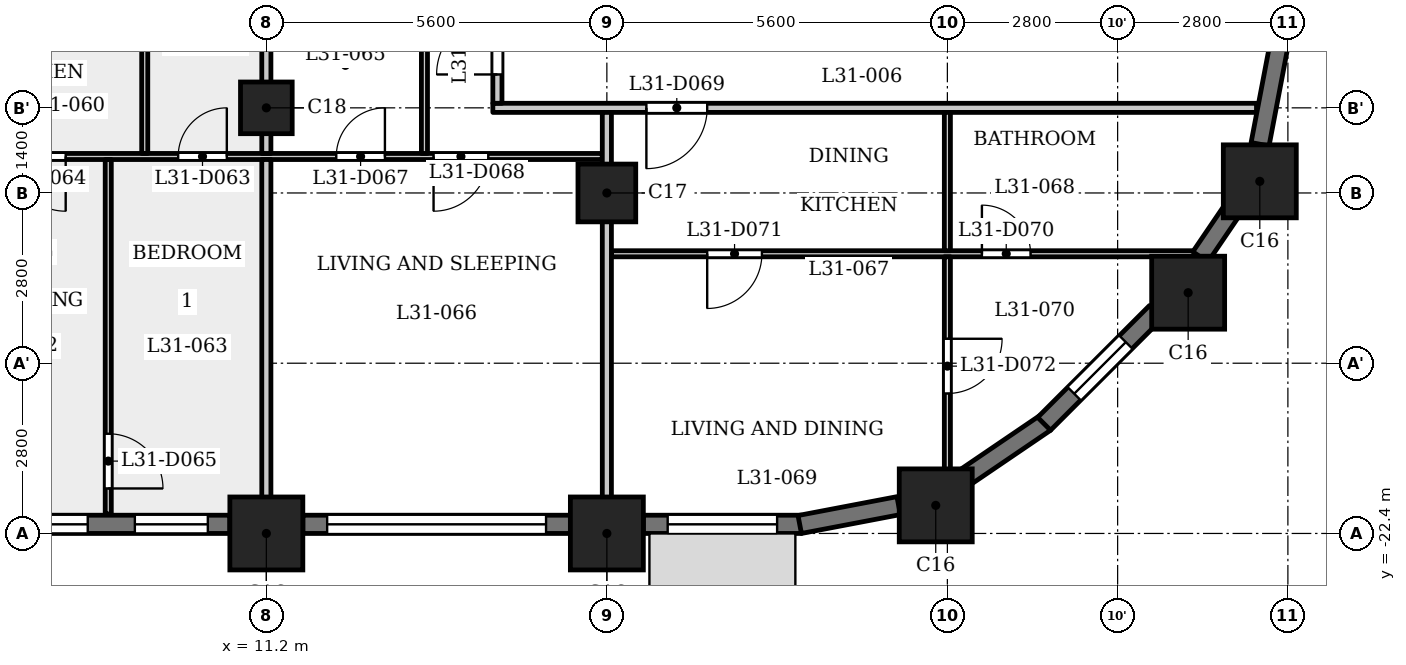
"""IFC4 building model, lengths in metres.
Left out: names, types, materials, properties, quantities, classifications, styles, units other than length and angle.
Written with IfcOpenShell. Run it as: python <this file> out.ifc"""

import sys

from ifc_helpers import new_model, si_unit, direction, frame, frame_2d, origin, origin_2d, place, context, subcontext, project, spatial, rectangle, extrude, element, fill, save


model = new_model("IFC4")
c1 = context("Model", 3, precision=1e-05, world=origin(), true_north=direction((0.0, 1.0)))
c2 = subcontext(c1, "Body", "Model", "MODEL_VIEW")
j1 = project(units=[si_unit("LENGTHUNIT", "METRE"), si_unit("PLANEANGLEUNIT", "RADIAN")], contexts=[c1])
p1 = place(None, origin())
s1 = spatial("IfcSite", under=j1, at=p1, CompositionType="ELEMENT")
p2 = place(p1, origin())
s2 = spatial("IfcBuilding", under=s1, at=p2, CompositionType="ELEMENT")
p3 = place(p2, frame((0.0, 0.0, 121.8)))
s3 = spatial("IfcBuildingStorey", under=s2, at=p3, CompositionType="ELEMENT", Elevation=121.8)
for number, where, z_axis, x_axis in (
    (1, (11.2, -22.4, 0.0), (0.0, 0.0, 1.0), (1.0, 0.0, 0.0)),
    (2, (16.8, -22.4, 0.0), (0.0, 0.0, 1.0), (1.0, 0.0, 0.0)),
    (3, (22.209, -21.938, 0.0), (0.0, 0.0, 1.0), (1.0, 0.0, 0.0)),
    (4, (26.36, -18.44, 0.0), (0.0, 0.0, 1.0), (1.0, 0.0, 0.0)),
    (5, (27.538, -16.609, 0.0), (0.0, 0.0, 1.0), (1.0, 0.0, 0.0)),
):
    element("IfcColumn", number, at=place(p3, frame(where, z_axis=z_axis, x_axis=x_axis)), inside=s3, PredefinedType="COLUMN", context=c2, shape_type="SweptSolid", body=[
        extrude(rectangle(XDim=1.2, YDim=1.2, at=origin_2d()), origin(), (0.0, 0.0, 1.0), 3.5),
    ])
p4 = place(p3, frame((16.8, -16.8, 0.0), z_axis=(0.0, 0.0, 1.0), x_axis=(1.0, 0.0, 0.0)))
e6 = element("IfcColumn", 6, at=p4, inside=s3, PredefinedType="COLUMN", context=c2, shape_type="SweptSolid", body=[
    extrude(rectangle(XDim=0.95, YDim=0.95, at=origin_2d()), origin(), (0.0, 0.0, 1.0), 3.5),
])
p5 = place(p3, frame((11.2, -15.4, 0.0), z_axis=(0.0, 0.0, 1.0), x_axis=(1.0, 0.0, 0.0)))
e7 = element("IfcColumn", 7, at=p5, inside=s3, PredefinedType="COLUMN", context=c2, shape_type="SweptSolid", body=[
    extrude(rectangle(XDim=0.85, YDim=0.85, at=origin_2d()), origin(), (0.0, 0.0, 1.0), 3.5),
])
p6 = place(p3, frame((6.2, -22.25, 0.0), z_axis=(0.0, 0.0, 1.0), x_axis=(1.0, 0.0, 0.0)))
e8 = element("IfcWall", 8, at=p6, inside=s3, PredefinedType="SOLIDWALL", context=c2, shape_type="SweptSolid", body=[
    extrude(rectangle(XDim=4.4, YDim=0.3, at=frame_2d((2.2, 0.0))), origin(), (0.0, 0.0, 1.0), 2.35),
])
p7 = place(p6, frame((0.262, 0.0, 0.9)))
e9 = element("IfcOpeningElement", 9, at=p7, cuts=e8, PredefinedType="OPENING", context=c2, shape_type="SweptSolid", body=[
    extrude(rectangle(XDim=1.8, YDim=1.25, at=frame_2d((0.9, 0.625))), frame((0.0, 0.16, 0.0), z_axis=(0.0, -1.0, 0.0), x_axis=(1.0, 0.0, 0.0)), (0.0, 0.0, 1.0), 0.32),
])
p8 = place(p6, frame((2.837, 0.0, 0.6)))
e10 = element("IfcOpeningElement", 10, at=p8, cuts=e8, PredefinedType="OPENING", context=c2, shape_type="SweptSolid", body=[
    extrude(rectangle(XDim=1.2, YDim=1.55, at=frame_2d((0.6, 0.775))), frame((0.0, 0.16, 0.0), z_axis=(0.0, -1.0, 0.0), x_axis=(1.0, 0.0, 0.0)), (0.0, 0.0, 1.0), 0.32),
])
p9 = place(p3, frame((11.8, -22.25, 0.0), z_axis=(0.0, 0.0, 1.0), x_axis=(1.0, 0.0, 0.0)))
e11 = element("IfcWall", 11, at=p9, inside=s3, PredefinedType="SOLIDWALL", context=c2, shape_type="SweptSolid", body=[
    extrude(rectangle(XDim=4.4, YDim=0.3, at=frame_2d((2.2, 0.0))), origin(), (0.0, 0.0, 1.0), 2.35),
])
p10 = place(p9, frame((0.4, 0.0, 1.2)))
e12 = element("IfcOpeningElement", 12, at=p10, cuts=e11, PredefinedType="OPENING", context=c2, shape_type="SweptSolid", body=[
    extrude(rectangle(XDim=3.6, YDim=0.95, at=frame_2d((1.8, 0.475))), frame((0.0, 0.16, 0.0), z_axis=(0.0, -1.0, 0.0), x_axis=(1.0, 0.0, 0.0)), (0.0, 0.0, 1.0), 0.32),
])
p11 = place(p3, frame((17.4, -22.25, 0.0), z_axis=(0.0, 0.0, 1.0), x_axis=(1.0, 0.0, 0.0)))
e13 = element("IfcWall", 13, at=p11, inside=s3, PredefinedType="SOLIDWALL", context=c2, shape_type="SweptSolid", body=[
    extrude(rectangle(XDim=2.6, YDim=0.3, at=frame_2d((1.3, 0.0))), origin(), (0.0, 0.0, 1.0), 2.35),
])
p12 = place(p11, frame((0.4, 0.0, 0.9)))
e14 = element("IfcOpeningElement", 14, at=p12, cuts=e13, PredefinedType="OPENING", context=c2, shape_type="SweptSolid", body=[
    extrude(rectangle(XDim=1.8, YDim=1.25, at=frame_2d((0.9, 0.625))), frame((0.0, 0.16, 0.0), z_axis=(0.0, -1.0, 0.0), x_axis=(1.0, 0.0, 0.0)), (0.0, 0.0, 1.0), 0.32),
])
for number, where, z_axis, x_axis in (
    (15, (19.972, -22.253, 0.0), (0.0, 0.0, 1.0), (0.982, 0.187, 0.0)),
    (16, (22.643, -21.51, 0.0), (0.0, 0.0, 1.0), (0.827, 0.562, 0.0)),
):
    element("IfcWall", number, at=place(p3, frame(where, z_axis=z_axis, x_axis=x_axis)), inside=s3, PredefinedType="SOLIDWALL", context=c2, shape_type="SweptSolid", body=[
        extrude(rectangle(XDim=1.656, YDim=0.3, at=frame_2d((0.828, 0.0))), origin(), (0.0, 0.0, 1.0), 2.35),
    ])
p13 = place(p3, frame((23.991, -20.597, 0.0), z_axis=(0.0, 0.0, 1.0), x_axis=(0.707106781187, 0.707106781187, 0.0)))
e17 = element("IfcWall", 17, at=p13, inside=s3, PredefinedType="SOLIDWALL", context=c2, shape_type="SweptSolid", body=[
    extrude(rectangle(XDim=2.6, YDim=0.3, at=frame_2d((1.3, 0.0))), origin(), (0.0, 0.0, 1.0), 2.35),
])
p14 = place(p13, frame((0.7, 0.0, 0.6)))
e18 = element("IfcOpeningElement", 18, at=p14, cuts=e17, PredefinedType="OPENING", context=c2, shape_type="SweptSolid", body=[
    extrude(rectangle(XDim=1.2, YDim=1.55, at=frame_2d((0.6, 0.775))), frame((0.0, 0.16, 0.0), z_axis=(0.0, -1.0, 0.0), x_axis=(1.0, 0.0, 0.0)), (0.0, 0.0, 1.0), 0.32),
])
p15 = place(p3, frame((26.561, -17.851, 0.0), z_axis=(0.0, 0.0, 1.0), x_axis=(0.562173331661, 0.827019434577, 0.0)))
e19 = element("IfcWall", 19, at=p15, inside=s3, PredefinedType="SOLIDWALL", context=c2, shape_type="SweptSolid", body=[
    extrude(rectangle(XDim=0.977, YDim=0.3, at=frame_2d((0.489, 0.0))), origin(), (0.0, 0.0, 1.0), 3.15),
])
p16 = place(p3, frame((27.542, -15.999, 0.0), z_axis=(0.0, 0.0, 1.0), x_axis=(0.187349172861, 0.982293381546, 0.0)))
e20 = element("IfcWall", 20, at=p16, inside=s3, PredefinedType="SOLIDWALL", context=c2, shape_type="SweptSolid", body=[
    extrude(rectangle(XDim=1.656, YDim=0.3, at=frame_2d((0.828, 0.0))), origin(), (0.0, 0.0, 1.0), 2.35),
])
p17 = place(p3, frame((16.875, -17.8, 0.0), z_axis=(0.0, 0.0, 1.0), x_axis=(1.0, 0.0, 0.0)))
e21 = element("IfcWall", 21, at=p17, inside=s3, PredefinedType="PARTITIONING", context=c2, shape_type="SweptSolid", body=[
    extrude(rectangle(XDim=9.59, YDim=0.1, at=frame_2d((4.795, 0.0))), origin(), (0.0, 0.0, 1.0), 3.15),
])
p18 = place(p17, frame((6.093, 0.0, 0.0)))
e22 = element("IfcOpeningElement", 22, at=p18, cuts=e21, PredefinedType="OPENING", context=c2, shape_type="SweptSolid", body=[
    extrude(rectangle(XDim=0.8, YDim=2.1, at=frame_2d((0.4, 1.05))), frame((0.0, 0.06, 0.0), z_axis=(0.0, -1.0, 0.0), x_axis=(1.0, 0.0, 0.0)), (0.0, 0.0, 1.0), 0.12),
])
p19 = place(p17, frame((1.575, 0.0, 0.0)))
e23 = element("IfcOpeningElement", 23, at=p19, cuts=e21, PredefinedType="OPENING", context=c2, shape_type="SweptSolid", body=[
    extrude(rectangle(XDim=0.9, YDim=2.1, at=frame_2d((0.45, 1.05))), frame((0.0, 0.06, 0.0), z_axis=(0.0, -1.0, 0.0), x_axis=(1.0, 0.0, 0.0)), (0.0, 0.0, 1.0), 0.12),
])
p20 = place(p3, frame((-16.725, -16.2, 0.0), z_axis=(0.0, 0.0, 1.0), x_axis=(1.0, 0.0, 0.0)))
e24 = element("IfcWall", 24, at=p20, inside=s3, PredefinedType="PARTITIONING", context=c2, shape_type="SweptSolid", body=[
    extrude(rectangle(XDim=33.45, YDim=0.1, at=frame_2d((16.725, 0.0))), origin(), (0.0, 0.0, 1.0), 3.15),
])
p21 = place(p20, frame((4.075, 0.0, 0.0)))
e25 = element("IfcOpeningElement", 25, at=p21, cuts=e24, PredefinedType="OPENING", context=c2, shape_type="SweptSolid", body=[
    extrude(rectangle(XDim=0.8, YDim=2.1, at=frame_2d((0.4, 1.05))), frame((0.0, 0.06, 0.0), z_axis=(0.0, -1.0, 0.0), x_axis=(1.0, 0.0, 0.0)), (0.0, 0.0, 1.0), 0.12),
])
p22 = place(p20, frame((9.425, 0.0, 0.0)))
e26 = element("IfcOpeningElement", 26, at=p22, cuts=e24, PredefinedType="OPENING", context=c2, shape_type="SweptSolid", body=[
    extrude(rectangle(XDim=0.9, YDim=2.1, at=frame_2d((0.45, 1.05))), frame((0.0, 0.06, 0.0), z_axis=(0.0, -1.0, 0.0), x_axis=(1.0, 0.0, 0.0)), (0.0, 0.0, 1.0), 0.12),
])
p23 = place(p20, frame((19.875, 0.0, 0.0)))
e27 = element("IfcOpeningElement", 27, at=p23, cuts=e24, PredefinedType="OPENING", context=c2, shape_type="SweptSolid", body=[
    extrude(rectangle(XDim=0.8, YDim=2.1, at=frame_2d((0.4, 1.05))), frame((0.0, 0.06, 0.0), z_axis=(0.0, -1.0, 0.0), x_axis=(1.0, 0.0, 0.0)), (0.0, 0.0, 1.0), 0.12),
])
p24 = place(p20, frame((17.375, 0.0, 0.0)))
e28 = element("IfcOpeningElement", 28, at=p24, cuts=e24, PredefinedType="OPENING", context=c2, shape_type="SweptSolid", body=[
    extrude(rectangle(XDim=0.9, YDim=2.1, at=frame_2d((0.45, 1.05))), frame((0.0, 0.06, 0.0), z_axis=(0.0, -1.0, 0.0), x_axis=(1.0, 0.0, 0.0)), (0.0, 0.0, 1.0), 0.12),
])
p25 = place(p20, frame((12.525, 0.0, 0.0)))
e29 = element("IfcOpeningElement", 29, at=p25, cuts=e24, PredefinedType="OPENING", context=c2, shape_type="SweptSolid", body=[
    extrude(rectangle(XDim=0.9, YDim=2.1, at=frame_2d((0.45, 1.05))), frame((0.0, 0.06, 0.0), z_axis=(0.0, -1.0, 0.0), x_axis=(1.0, 0.0, 0.0)), (0.0, 0.0, 1.0), 0.12),
])
p26 = place(p20, frame((14.775, 0.0, 0.0)))
e30 = element("IfcOpeningElement", 30, at=p26, cuts=e24, PredefinedType="OPENING", context=c2, shape_type="SweptSolid", body=[
    extrude(rectangle(XDim=0.9, YDim=2.1, at=frame_2d((0.45, 1.05))), frame((0.0, 0.06, 0.0), z_axis=(0.0, -1.0, 0.0), x_axis=(1.0, 0.0, 0.0)), (0.0, 0.0, 1.0), 0.12),
])
p27 = place(p20, frame((26.475, 0.0, 0.0)))
e31 = element("IfcOpeningElement", 31, at=p27, cuts=e24, PredefinedType="OPENING", context=c2, shape_type="SweptSolid", body=[
    extrude(rectangle(XDim=0.8, YDim=2.1, at=frame_2d((0.4, 1.05))), frame((0.0, 0.06, 0.0), z_axis=(0.0, -1.0, 0.0), x_axis=(1.0, 0.0, 0.0)), (0.0, 0.0, 1.0), 0.12),
])
p28 = place(p20, frame((23.725, 0.0, 0.0)))
e32 = element("IfcOpeningElement", 32, at=p28, cuts=e24, PredefinedType="OPENING", context=c2, shape_type="SweptSolid", body=[
    extrude(rectangle(XDim=0.9, YDim=2.1, at=frame_2d((0.45, 1.05))), frame((0.0, 0.06, 0.0), z_axis=(0.0, -1.0, 0.0), x_axis=(1.0, 0.0, 0.0)), (0.0, 0.0, 1.0), 0.12),
])
p29 = place(p20, frame((29.075, 0.0, 0.0)))
e33 = element("IfcOpeningElement", 33, at=p29, cuts=e24, PredefinedType="OPENING", context=c2, shape_type="SweptSolid", body=[
    extrude(rectangle(XDim=0.8, YDim=2.1, at=frame_2d((0.4, 1.05))), frame((0.0, 0.06, 0.0), z_axis=(0.0, -1.0, 0.0), x_axis=(1.0, 0.0, 0.0)), (0.0, 0.0, 1.0), 0.12),
])
p30 = place(p20, frame((30.675, 0.0, 0.0)))
e34 = element("IfcOpeningElement", 34, at=p30, cuts=e24, PredefinedType="OPENING", context=c2, shape_type="SweptSolid", body=[
    extrude(rectangle(XDim=0.9, YDim=2.1, at=frame_2d((0.45, 1.05))), frame((0.0, 0.06, 0.0), z_axis=(0.0, -1.0, 0.0), x_axis=(1.0, 0.0, 0.0)), (0.0, 0.0, 1.0), 0.12),
])
p31 = place(p3, frame((14.925, -15.4, 0.0), z_axis=(0.0, 0.0, 1.0), x_axis=(1.0, 0.0, 0.0)))
e35 = element("IfcWall", 35, at=p31, inside=s3, PredefinedType="PARTITIONING", context=c2, shape_type="SweptSolid", body=[
    extrude(rectangle(XDim=12.559, YDim=0.15, at=frame_2d((6.279, 0.0))), origin(), (0.0, 0.0, 1.0), 3.15),
])
p32 = place(p31, frame((2.525, 0.0, 0.0)))
e36 = element("IfcOpeningElement", 36, at=p32, cuts=e35, PredefinedType="OPENING", context=c2, shape_type="SweptSolid", body=[
    extrude(rectangle(XDim=1.0, YDim=2.1, at=frame_2d((0.5, 1.05))), frame((0.0, 0.085, 0.0), z_axis=(0.0, -1.0, 0.0), x_axis=(1.0, 0.0, 0.0)), (0.0, 0.0, 1.0), 0.17),
])
p33 = place(p3, frame((8.6, -22.08, 0.0), z_axis=(0.0, 0.0, 1.0), x_axis=(0.0, 1.0, 0.0)))
e37 = element("IfcWall", 37, at=p33, inside=s3, PredefinedType="PARTITIONING", context=c2, shape_type="SweptSolid", body=[
    extrude(rectangle(XDim=5.83, YDim=0.1, at=frame_2d((2.915, 0.0))), origin(), (0.0, 0.0, 1.0), 3.15),
])
p34 = place(p33, frame((0.42, 0.0, 0.0)))
e38 = element("IfcOpeningElement", 38, at=p34, cuts=e37, PredefinedType="OPENING", context=c2, shape_type="SweptSolid", body=[
    extrude(rectangle(XDim=0.9, YDim=2.1, at=frame_2d((0.45, 1.05))), frame((0.0, 0.06, 0.0), z_axis=(0.0, -1.0, 0.0), x_axis=(1.0, 0.0, 0.0)), (0.0, 0.0, 1.0), 0.12),
])
p35 = place(p3, frame((9.2, -16.15, 0.0), z_axis=(0.0, 0.0, 1.0), x_axis=(0.0, 1.0, 0.0)))
e39 = element("IfcWall", 39, at=p35, inside=s3, PredefinedType="PARTITIONING", context=c2, shape_type="SweptSolid", body=[
    extrude(rectangle(XDim=2.875, YDim=0.1, at=frame_2d((1.438, 0.0))), origin(), (0.0, 0.0, 1.0), 3.15),
])
p36 = place(p3, frame((11.2, -22.98, 0.0), z_axis=(0.0, 0.0, 1.0), x_axis=(0.0, 1.0, 0.0)))
e40 = element("IfcWall", 40, at=p36, inside=s3, PredefinedType="PARTITIONING", context=c2, shape_type="SweptSolid", body=[
    extrude(rectangle(XDim=6.73, YDim=0.15, at=frame_2d((3.365, 0.0))), origin(), (0.0, 0.0, 1.0), 3.15),
])
p37 = place(p3, frame((11.2, -16.15, 0.0), z_axis=(0.0, 0.0, 1.0), x_axis=(0.0, 1.0, 0.0)))
e41 = element("IfcWall", 41, at=p37, inside=s3, PredefinedType="PARTITIONING", context=c2, shape_type="SweptSolid", body=[
    extrude(rectangle(XDim=2.875, YDim=0.15, at=frame_2d((1.438, 0.0))), origin(), (0.0, 0.0, 1.0), 3.15),
])
p38 = place(p3, frame((13.8, -16.15, 0.0), z_axis=(0.0, 0.0, 1.0), x_axis=(0.0, 1.0, 0.0)))
e42 = element("IfcWall", 42, at=p38, inside=s3, PredefinedType="PARTITIONING", context=c2, shape_type="SweptSolid", body=[
    extrude(rectangle(XDim=2.875, YDim=0.1, at=frame_2d((1.438, 0.0))), origin(), (0.0, 0.0, 1.0), 3.15),
])
p39 = place(p3, frame((15.0, -15.325, 0.0), z_axis=(0.0, 0.0, 1.0), x_axis=(0.0, 1.0, 0.0)))
e43 = element("IfcWall", 43, at=p39, inside=s3, PredefinedType="PARTITIONING", context=c2, shape_type="SweptSolid", body=[
    extrude(rectangle(XDim=2.05, YDim=0.15, at=frame_2d((1.025, 0.0))), origin(), (0.0, 0.0, 1.0), 3.15),
])
p40 = place(p39, frame((0.474, 0.0, 0.0)))
e44 = element("IfcOpeningElement", 44, at=p40, cuts=e43, PredefinedType="OPENING", context=c2, shape_type="SweptSolid", body=[
    extrude(rectangle(XDim=1.0, YDim=2.1, at=frame_2d((0.5, 1.05))), frame((0.0, 0.085, 0.0), z_axis=(0.0, -1.0, 0.0), x_axis=(1.0, 0.0, 0.0)), (0.0, 0.0, 1.0), 0.17),
])
p41 = place(p3, frame((16.8, -22.98, 0.0), z_axis=(0.0, 0.0, 1.0), x_axis=(0.0, 1.0, 0.0)))
e45 = element("IfcWall", 45, at=p41, inside=s3, PredefinedType="PARTITIONING", context=c2, shape_type="SweptSolid", body=[
    extrude(rectangle(XDim=7.505, YDim=0.15, at=frame_2d((3.752, 0.0))), origin(), (0.0, 0.0, 1.0), 3.15),
])
p42 = place(p3, frame((22.4, -21.72, 0.0), z_axis=(0.0, 0.0, 1.0), x_axis=(0.0, 1.0, 0.0)))
e46 = element("IfcWall", 46, at=p42, inside=s3, PredefinedType="PARTITIONING", context=c2, shape_type="SweptSolid", body=[
    extrude(rectangle(XDim=3.87, YDim=0.1, at=frame_2d((1.935, 0.0))), origin(), (0.0, 0.0, 1.0), 3.15),
])
p43 = place(p42, frame((1.622, 0.0, 0.0)))
e47 = element("IfcOpeningElement", 47, at=p43, cuts=e46, PredefinedType="OPENING", context=c2, shape_type="SweptSolid", body=[
    extrude(rectangle(XDim=0.9, YDim=2.1, at=frame_2d((0.45, 1.05))), frame((0.0, 0.06, 0.0), z_axis=(0.0, -1.0, 0.0), x_axis=(1.0, 0.0, 0.0)), (0.0, 0.0, 1.0), 0.12),
])
p44 = place(p3, frame((22.4, -17.75, 0.0), z_axis=(0.0, 0.0, 1.0), x_axis=(0.0, 1.0, 0.0)))
e48 = element("IfcWall", 48, at=p44, inside=s3, PredefinedType="PARTITIONING", context=c2, shape_type="SweptSolid", body=[
    extrude(rectangle(XDim=2.275, YDim=0.1, at=frame_2d((1.137, 0.0))), origin(), (0.0, 0.0, 1.0), 3.15),
])
p45 = place(p27, origin())
e49 = element("IfcDoor", 49, at=p45, inside=s3, OperationType="SINGLE_SWING_LEFT", PredefinedType="DOOR", context=c2, shape_type="SweptSolid", body=[
    extrude(rectangle(XDim=0.8, YDim=2.1, at=frame_2d((0.4, 1.05))), frame((0.0, 0.025, 0.0), z_axis=(0.0, -1.0, 0.0), x_axis=(1.0, 0.0, 0.0)), (0.0, 0.0, 1.0), 0.05),
])
fill(e31, e49)
p46 = place(p28, origin())
e50 = element("IfcDoor", 50, at=p46, inside=s3, OperationType="SINGLE_SWING_RIGHT", PredefinedType="DOOR", context=c2, shape_type="SweptSolid", body=[
    extrude(rectangle(XDim=0.9, YDim=2.1, at=frame_2d((0.45, 1.05))), frame((0.0, 0.025, 0.0), z_axis=(0.0, -1.0, 0.0), x_axis=(1.0, 0.0, 0.0)), (0.0, 0.0, 1.0), 0.05),
])
fill(e32, e50)
p47 = place(p34, origin())
e51 = element("IfcDoor", 51, at=p47, inside=s3, OperationType="SINGLE_SWING_LEFT", PredefinedType="DOOR", context=c2, shape_type="SweptSolid", body=[
    extrude(rectangle(XDim=0.9, YDim=2.1, at=frame_2d((0.45, 1.05))), frame((0.0, 0.025, 0.0), z_axis=(0.0, -1.0, 0.0), x_axis=(1.0, 0.0, 0.0)), (0.0, 0.0, 1.0), 0.05),
])
fill(e38, e51)
p48 = place(p40, origin())
e52 = element("IfcDoor", 52, at=p48, inside=s3, OperationType="SINGLE_SWING_RIGHT", PredefinedType="DOOR", context=c2, shape_type="SweptSolid", body=[
    extrude(rectangle(XDim=1.0, YDim=2.1, at=frame_2d((0.5, 1.05))), frame((0.0, 0.025, 0.0), z_axis=(0.0, -1.0, 0.0), x_axis=(1.0, 0.0, 0.0)), (0.0, 0.0, 1.0), 0.05),
])
fill(e44, e52)
p49 = place(p29, origin())
e53 = element("IfcDoor", 53, at=p49, inside=s3, OperationType="SINGLE_SWING_LEFT", PredefinedType="DOOR", context=c2, shape_type="SweptSolid", body=[
    extrude(rectangle(XDim=0.8, YDim=2.1, at=frame_2d((0.4, 1.05))), frame((0.0, 0.025, 0.0), z_axis=(0.0, -1.0, 0.0), x_axis=(1.0, 0.0, 0.0)), (0.0, 0.0, 1.0), 0.05),
])
fill(e33, e53)
p50 = place(p30, origin())
e54 = element("IfcDoor", 54, at=p50, inside=s3, OperationType="SINGLE_SWING_LEFT", PredefinedType="DOOR", context=c2, shape_type="SweptSolid", body=[
    extrude(rectangle(XDim=0.9, YDim=2.1, at=frame_2d((0.45, 1.05))), frame((0.0, 0.025, 0.0), z_axis=(0.0, -1.0, 0.0), x_axis=(1.0, 0.0, 0.0)), (0.0, 0.0, 1.0), 0.05),
])
fill(e34, e54)
p51 = place(p32, origin())
e55 = element("IfcDoor", 55, at=p51, inside=s3, OperationType="SINGLE_SWING_LEFT", PredefinedType="DOOR", context=c2, shape_type="SweptSolid", body=[
    extrude(rectangle(XDim=1.0, YDim=2.1, at=frame_2d((0.5, 1.05))), frame((0.0, 0.025, 0.0), z_axis=(0.0, -1.0, 0.0), x_axis=(1.0, 0.0, 0.0)), (0.0, 0.0, 1.0), 0.05),
])
fill(e36, e55)
p52 = place(p18, origin())
e56 = element("IfcDoor", 56, at=p52, inside=s3, OperationType="SINGLE_SWING_RIGHT", PredefinedType="DOOR", context=c2, shape_type="SweptSolid", body=[
    extrude(rectangle(XDim=0.8, YDim=2.1, at=frame_2d((0.4, 1.05))), frame((0.0, 0.025, 0.0), z_axis=(0.0, -1.0, 0.0), x_axis=(1.0, 0.0, 0.0)), (0.0, 0.0, 1.0), 0.05),
])
fill(e22, e56)
p53 = place(p19, origin())
e57 = element("IfcDoor", 57, at=p53, inside=s3, OperationType="SINGLE_SWING_LEFT", PredefinedType="DOOR", context=c2, shape_type="SweptSolid", body=[
    extrude(rectangle(XDim=0.9, YDim=2.1, at=frame_2d((0.45, 1.05))), frame((0.0, 0.025, 0.0), z_axis=(0.0, -1.0, 0.0), x_axis=(1.0, 0.0, 0.0)), (0.0, 0.0, 1.0), 0.05),
])
fill(e23, e57)
p54 = place(p43, origin())
e58 = element("IfcDoor", 58, at=p54, inside=s3, OperationType="SINGLE_SWING_RIGHT", PredefinedType="DOOR", context=c2, shape_type="SweptSolid", body=[
    extrude(rectangle(XDim=0.9, YDim=2.1, at=frame_2d((0.45, 1.05))), frame((0.0, 0.025, 0.0), z_axis=(0.0, -1.0, 0.0), x_axis=(1.0, 0.0, 0.0)), (0.0, 0.0, 1.0), 0.05),
])
fill(e47, e58)
p55 = place(p7, origin())
e59 = element("IfcWindow", 59, at=p55, inside=s3, PartitioningType="SINGLE_PANEL", PredefinedType="WINDOW", context=c2, shape_type="SweptSolid", body=[
    extrude(rectangle(XDim=1.8, YDim=1.25, at=frame_2d((0.9, 0.625))), frame((0.0, 0.03, 0.0), z_axis=(0.0, -1.0, 0.0), x_axis=(1.0, 0.0, 0.0)), (0.0, 0.0, 1.0), 0.06),
])
fill(e9, e59)
p56 = place(p8, origin())
e60 = element("IfcWindow", 60, at=p56, inside=s3, PartitioningType="SINGLE_PANEL", PredefinedType="WINDOW", context=c2, shape_type="SweptSolid", body=[
    extrude(rectangle(XDim=1.2, YDim=1.55, at=frame_2d((0.6, 0.775))), frame((0.0, 0.03, 0.0), z_axis=(0.0, -1.0, 0.0), x_axis=(1.0, 0.0, 0.0)), (0.0, 0.0, 1.0), 0.06),
])
fill(e10, e60)
p57 = place(p10, origin())
e61 = element("IfcWindow", 61, at=p57, inside=s3, PartitioningType="SINGLE_PANEL", PredefinedType="WINDOW", context=c2, shape_type="SweptSolid", body=[
    extrude(rectangle(XDim=3.6, YDim=0.95, at=frame_2d((1.8, 0.475))), frame((0.0, 0.03, 0.0), z_axis=(0.0, -1.0, 0.0), x_axis=(1.0, 0.0, 0.0)), (0.0, 0.0, 1.0), 0.06),
])
fill(e12, e61)
p58 = place(p12, origin())
e62 = element("IfcWindow", 62, at=p58, inside=s3, PartitioningType="SINGLE_PANEL", PredefinedType="WINDOW", context=c2, shape_type="SweptSolid", body=[
    extrude(rectangle(XDim=1.8, YDim=1.25, at=frame_2d((0.9, 0.625))), frame((0.0, 0.03, 0.0), z_axis=(0.0, -1.0, 0.0), x_axis=(1.0, 0.0, 0.0)), (0.0, 0.0, 1.0), 0.06),
])
fill(e14, e62)
p59 = place(p14, origin())
e63 = element("IfcWindow", 63, at=p59, inside=s3, PartitioningType="SINGLE_PANEL", PredefinedType="WINDOW", context=c2, shape_type="SweptSolid", body=[
    extrude(rectangle(XDim=1.2, YDim=1.55, at=frame_2d((0.6, 0.775))), frame((0.0, 0.03, 0.0), z_axis=(0.0, -1.0, 0.0), x_axis=(1.0, 0.0, 0.0)), (0.0, 0.0, 1.0), 0.06),
])
fill(e18, e63)
save(model, sys.argv[1])
